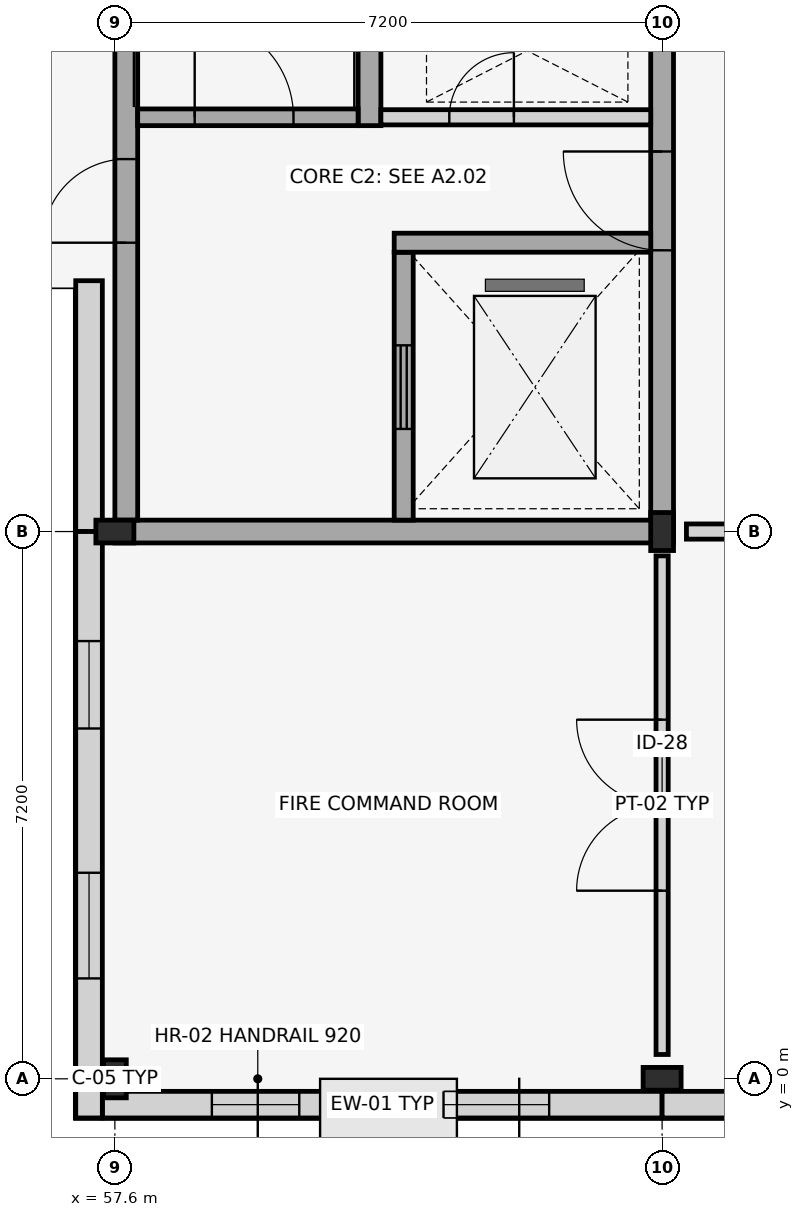
"""IFC4 building model, lengths in metres.
Left out: names, types, materials, properties, quantities, classifications, styles, units other than length and angle.
Written with IfcOpenShell. Run it as: python <this file> out.ifc"""

import sys

from ifc_helpers import new_model, si_unit, direction, frame, frame_2d, origin, origin_2d, place, context, subcontext, project, spatial, rectangle, i_section, extrude, element, fill, save


model = new_model("IFC4")
c1 = context("Model", 3, precision=1e-05, world=origin(), true_north=direction((0.0, 1.0)))
c2 = subcontext(c1, "Body", "Model", "MODEL_VIEW")
j1 = project(units=[si_unit("LENGTHUNIT", "METRE"), si_unit("PLANEANGLEUNIT", "RADIAN")], contexts=[c1])
p1 = place(None, origin())
s1 = spatial("IfcSite", under=j1, at=p1, CompositionType="ELEMENT")
p2 = place(p1, origin())
s2 = spatial("IfcBuilding", under=s1, at=p2, CompositionType="ELEMENT")
p3 = place(p2, origin())
s3 = spatial("IfcBuildingStorey", under=s2, at=p3, CompositionType="ELEMENT", Elevation=0.0)
for number, where, z_axis, x_axis in (
    (1, (57.6, 0.0, 0.0), (0.0, 0.0, 1.0), (1.0, 0.0, 0.0)),
    (2, (57.6, 7.2, 0.0), (0.0, 0.0, 1.0), (0.0, 1.0, 0.0)),
    (3, (64.8, 0.0, 0.0), (0.0, 0.0, 1.0), (0.0, 1.0, 0.0)),
    (4, (64.8, 7.2, 0.0), (0.0, 0.0, 1.0), (1.0, 0.0, 0.0)),
):
    element("IfcColumn", number, at=place(p3, frame(where, z_axis=z_axis, x_axis=x_axis)), inside=s3, PredefinedType="COLUMN", context=c2, shape_type="SweptSolid", body=[
        extrude(i_section(OverallWidth=0.3, OverallDepth=0.5, WebThickness=0.014, FlangeThickness=0.028, FilletRadius=0.027, at=origin_2d()), origin(), (0.0, 0.0, 1.0), 4.5),
    ])
p4 = place(p3, frame((57.435, -0.34, 0.0), z_axis=(0.0, 0.0, 1.0), x_axis=(1.0, 0.0, 0.0)))
e5 = element("IfcWall", 5, at=p4, inside=s3, PredefinedType="STANDARD", context=c2, shape_type="SweptSolid", body=[
    extrude(rectangle(XDim=7.365, YDim=0.35, at=frame_2d((3.683, 0.0))), origin(), (0.0, 0.0, 1.0), 4.5),
])
p5 = place(p4, frame((1.441, 0.0, 0.9)))
e6 = element("IfcOpeningElement", 6, at=p5, cuts=e5, PredefinedType="OPENING", context=c2, shape_type="SweptSolid", body=[
    extrude(rectangle(XDim=1.15, YDim=1.68, at=frame_2d((0.575, 0.84))), frame((0.0, 0.185, 0.0), z_axis=(0.0, -1.0, 0.0), x_axis=(1.0, 0.0, 0.0)), (0.0, 0.0, 1.0), 0.37),
])
p6 = place(p4, frame((4.489, 0.0, 0.9)))
e7 = element("IfcOpeningElement", 7, at=p6, cuts=e5, PredefinedType="OPENING", context=c2, shape_type="SweptSolid", body=[
    extrude(rectangle(XDim=1.39, YDim=1.68, at=frame_2d((0.695, 0.84))), frame((0.0, 0.185, 0.0), z_axis=(0.0, -1.0, 0.0), x_axis=(1.0, 0.0, 0.0)), (0.0, 0.0, 1.0), 0.37),
])
p7 = place(p3, frame((64.8, -0.34, 0.0), z_axis=(0.0, 0.0, 1.0), x_axis=(1.0, 0.0, 0.0)))
e8 = element("IfcWall", 8, at=p7, inside=s3, PredefinedType="STANDARD", context=c2, shape_type="SweptSolid", body=[
    extrude(rectangle(XDim=7.2, YDim=0.35, at=frame_2d((3.6, 0.0))), origin(), (0.0, 0.0, 1.0), 4.5),
])
p8 = place(p7, frame((1.201, 0.0, 0.9)))
e9 = element("IfcOpeningElement", 9, at=p8, cuts=e8, PredefinedType="OPENING", context=c2, shape_type="SweptSolid", body=[
    extrude(rectangle(XDim=1.63, YDim=1.68, at=frame_2d((0.815, 0.84))), frame((0.0, 0.185, 0.0), z_axis=(0.0, -1.0, 0.0), x_axis=(1.0, 0.0, 0.0)), (0.0, 0.0, 1.0), 0.37),
])
p9 = place(p7, frame((4.249, 0.0, 0.9)))
e10 = element("IfcOpeningElement", 10, at=p9, cuts=e8, PredefinedType="OPENING", context=c2, shape_type="SweptSolid", body=[
    extrude(rectangle(XDim=1.87, YDim=1.68, at=frame_2d((0.935, 0.84))), frame((0.0, 0.185, 0.0), z_axis=(0.0, -1.0, 0.0), x_axis=(1.0, 0.0, 0.0)), (0.0, 0.0, 1.0), 0.37),
])
p10 = place(p3, frame((57.26, 10.5, 0.0), z_axis=(0.0, 0.0, 1.0), x_axis=(0.0, -1.0, 0.0)))
e11 = element("IfcWall", 11, at=p10, inside=s3, PredefinedType="STANDARD", context=c2, shape_type="SweptSolid", body=[
    extrude(rectangle(XDim=3.3, YDim=0.35, at=frame_2d((1.65, 0.0))), origin(), (0.0, 0.0, 1.0), 4.5),
])
p11 = place(p3, frame((57.26, 7.2, 0.0), z_axis=(0.0, 0.0, 1.0), x_axis=(0.0, -1.0, 0.0)))
e12 = element("IfcWall", 12, at=p11, inside=s3, PredefinedType="STANDARD", context=c2, shape_type="SweptSolid", body=[
    extrude(rectangle(XDim=7.715, YDim=0.35, at=frame_2d((3.857, 0.0))), origin(), (0.0, 0.0, 1.0), 4.5),
])
p12 = place(p11, frame((1.441, 0.0, 0.9)))
e13 = element("IfcOpeningElement", 13, at=p12, cuts=e12, PredefinedType="OPENING", context=c2, shape_type="SweptSolid", body=[
    extrude(rectangle(XDim=1.15, YDim=1.68, at=frame_2d((0.575, 0.84))), frame((0.0, 0.185, 0.0), z_axis=(0.0, -1.0, 0.0), x_axis=(1.0, 0.0, 0.0)), (0.0, 0.0, 1.0), 0.37),
])
p13 = place(p11, frame((4.489, 0.0, 0.9)))
e14 = element("IfcOpeningElement", 14, at=p13, cuts=e12, PredefinedType="OPENING", context=c2, shape_type="SweptSolid", body=[
    extrude(rectangle(XDim=1.39, YDim=1.68, at=frame_2d((0.695, 0.84))), frame((0.0, 0.185, 0.0), z_axis=(0.0, -1.0, 0.0), x_axis=(1.0, 0.0, 0.0)), (0.0, 0.0, 1.0), 0.37),
])
p14 = place(p3, frame((57.6, 7.2, 0.0), z_axis=(0.0, 0.0, 1.0), x_axis=(1.0, 0.0, 0.0)))
e15 = element("IfcWall", 15, at=p14, inside=s3, PredefinedType="SHEAR", context=c2, shape_type="SweptSolid", body=[
    extrude(rectangle(XDim=7.35, YDim=0.3, at=frame_2d((3.675, 0.0))), origin(), (0.0, 0.0, 1.0), 4.28),
])
p15 = place(p3, frame((57.75, 7.35, 0.0), z_axis=(0.0, 0.0, 1.0), x_axis=(0.0, 1.0, 0.0)))
e16 = element("IfcWall", 16, at=p15, inside=s3, PredefinedType="SHEAR", context=c2, shape_type="SweptSolid", body=[
    extrude(rectangle(XDim=7.05, YDim=0.3, at=frame_2d((3.525, 0.0))), origin(), (0.0, 0.0, 1.0), 4.28),
])
p16 = place(p15, frame((3.65, 0.0, 0.0)))
e17 = element("IfcOpeningElement", 17, at=p16, cuts=e16, PredefinedType="OPENING", context=c2, shape_type="SweptSolid", body=[
    extrude(rectangle(XDim=1.1, YDim=2.2, at=frame_2d((0.55, 1.1))), frame((0.0, 0.16, 0.0), z_axis=(0.0, -1.0, 0.0), x_axis=(1.0, 0.0, 0.0)), (0.0, 0.0, 1.0), 0.32),
])
p17 = place(p3, frame((64.8, 7.35, 0.0), z_axis=(0.0, 0.0, 1.0), x_axis=(0.0, 1.0, 0.0)))
e18 = element("IfcWall", 18, at=p17, inside=s3, PredefinedType="SHEAR", context=c2, shape_type="SweptSolid", body=[
    extrude(rectangle(XDim=14.1, YDim=0.3, at=frame_2d((7.05, 0.0))), origin(), (0.0, 0.0, 1.0), 4.28),
])
p18 = place(p17, frame((3.55, 0.0, 0.0)))
e19 = element("IfcOpeningElement", 19, at=p18, cuts=e18, PredefinedType="OPENING", context=c2, shape_type="SweptSolid", body=[
    extrude(rectangle(XDim=1.3, YDim=2.2, at=frame_2d((0.65, 1.1))), frame((0.0, 0.16, 0.0), z_axis=(0.0, -1.0, 0.0), x_axis=(1.0, 0.0, 0.0)), (0.0, 0.0, 1.0), 0.32),
])
p19 = place(p17, frame((7.85, 0.0, 0.0)))
e20 = element("IfcOpeningElement", 20, at=p19, cuts=e18, PredefinedType="OPENING", context=c2, shape_type="SweptSolid", body=[
    extrude(rectangle(XDim=1.05, YDim=2.15, at=frame_2d((0.525, 1.075))), frame((0.0, 0.16, 0.0), z_axis=(0.0, -1.0, 0.0), x_axis=(1.0, 0.0, 0.0)), (0.0, 0.0, 1.0), 0.32),
])
p20 = place(p17, frame((10.55, 0.0, 0.0)))
e21 = element("IfcOpeningElement", 21, at=p20, cuts=e18, PredefinedType="OPENING", context=c2, shape_type="SweptSolid", body=[
    extrude(rectangle(XDim=1.0, YDim=2.15, at=frame_2d((0.5, 1.075))), frame((0.0, 0.16, 0.0), z_axis=(0.0, -1.0, 0.0), x_axis=(1.0, 0.0, 0.0)), (0.0, 0.0, 1.0), 0.32),
])
p21 = place(p3, frame((61.4, 7.35, 0.0), z_axis=(0.0, 0.0, 1.0), x_axis=(0.0, 1.0, 0.0)))
e22 = element("IfcWall", 22, at=p21, inside=s3, PredefinedType="SHEAR", context=c2, shape_type="SweptSolid", body=[
    extrude(rectangle(XDim=3.525, YDim=0.25, at=frame_2d((1.762, 0.0))), origin(), (0.0, 0.0, 1.0), 4.28),
])
p22 = place(p21, frame((1.2, 0.0, 0.0)))
e23 = element("IfcOpeningElement", 23, at=p22, cuts=e22, PredefinedType="OPENING", context=c2, shape_type="SweptSolid", body=[
    extrude(rectangle(XDim=1.1, YDim=2.15, at=frame_2d((0.55, 1.075))), frame((0.0, 0.135, 0.0), z_axis=(0.0, -1.0, 0.0), x_axis=(1.0, 0.0, 0.0)), (0.0, 0.0, 1.0), 0.27),
])
p23 = place(p3, frame((60.95, 12.54, 0.0), z_axis=(0.0, 0.0, 1.0), x_axis=(0.0, 1.0, 0.0)))
e24 = element("IfcWall", 24, at=p23, inside=s3, PredefinedType="SHEAR", context=c2, shape_type="SweptSolid", body=[
    extrude(rectangle(XDim=8.91, YDim=0.3, at=frame_2d((4.455, 0.0))), origin(), (0.0, 0.0, 1.0), 4.28),
])
p24 = place(p3, frame((61.1, 12.65, 0.0), z_axis=(0.0, 0.0, 1.0), x_axis=(1.0, 0.0, 0.0)))
e25 = element("IfcWall", 25, at=p24, inside=s3, PredefinedType="PLUMBINGWALL", context=c2, shape_type="SweptSolid", body=[
    extrude(rectangle(XDim=3.55, YDim=0.2, at=frame_2d((1.775, 0.0))), origin(), (0.0, 0.0, 1.0), 3.7),
])
p25 = place(p24, frame((0.9, 0.0, 0.0)))
e26 = element("IfcOpeningElement", 26, at=p25, cuts=e25, PredefinedType="OPENING", context=c2, shape_type="SweptSolid", body=[
    extrude(rectangle(XDim=0.85, YDim=2.05, at=frame_2d((0.425, 1.025))), frame((0.0, 0.11, 0.0), z_axis=(0.0, -1.0, 0.0), x_axis=(1.0, 0.0, 0.0)), (0.0, 0.0, 1.0), 0.22),
])
p26 = place(p3, frame((57.9, 12.65, 0.0), z_axis=(0.0, 0.0, 1.0), x_axis=(1.0, 0.0, 0.0)))
e27 = element("IfcWall", 27, at=p26, inside=s3, PredefinedType="SHEAR", context=c2, shape_type="SweptSolid", body=[
    extrude(rectangle(XDim=2.9, YDim=0.22, at=frame_2d((1.45, 0.0))), origin(), (0.0, 0.0, 1.0), 4.28),
])
p27 = place(p26, frame((0.75, 0.0, 0.0)))
e28 = element("IfcOpeningElement", 28, at=p27, cuts=e27, PredefinedType="OPENING", context=c2, shape_type="SweptSolid", body=[
    extrude(rectangle(XDim=1.3, YDim=2.2, at=frame_2d((0.65, 1.1))), frame((0.0, 0.12, 0.0), z_axis=(0.0, -1.0, 0.0), x_axis=(1.0, 0.0, 0.0)), (0.0, 0.0, 1.0), 0.24),
])
p28 = place(p3, frame((61.275, 11.0, 0.0), z_axis=(0.0, 0.0, 1.0), x_axis=(1.0, 0.0, 0.0)))
e29 = element("IfcWall", 29, at=p28, inside=s3, PredefinedType="SHEAR", context=c2, shape_type="SweptSolid", body=[
    extrude(rectangle(XDim=3.375, YDim=0.25, at=frame_2d((1.688, 0.0))), origin(), (0.0, 0.0, 1.0), 4.28),
])
p29 = place(p3, frame((64.8, 0.32, 0.0), z_axis=(0.0, 0.0, 1.0), x_axis=(0.0, 1.0, 0.0)))
e30 = element("IfcWall", 30, at=p29, inside=s3, PredefinedType="PARTITIONING", context=c2, shape_type="SweptSolid", body=[
    extrude(rectangle(XDim=6.56, YDim=0.16, at=frame_2d((3.28, 0.0))), origin(), (0.0, 0.0, 1.0), 3.45),
])
p30 = place(p29, frame((2.155, 0.0, 0.0)))
e31 = element("IfcOpeningElement", 31, at=p30, cuts=e30, PredefinedType="OPENING", context=c2, shape_type="SweptSolid", body=[
    extrude(rectangle(XDim=2.25, YDim=2.7, at=frame_2d((1.125, 1.35))), frame((0.0, 0.09, 0.0), z_axis=(0.0, -1.0, 0.0), x_axis=(1.0, 0.0, 0.0)), (0.0, 0.0, 1.0), 0.18),
])
p31 = place(p3, frame((65.12, 7.2, 0.0), z_axis=(0.0, 0.0, 1.0), x_axis=(1.0, 0.0, 0.0)))
e32 = element("IfcWall", 32, at=p31, inside=s3, PredefinedType="PARTITIONING", context=c2, shape_type="SweptSolid", body=[
    extrude(rectangle(XDim=6.56, YDim=0.2, at=frame_2d((3.28, 0.0))), origin(), (0.0, 0.0, 1.0), 3.45),
])
p32 = place(p31, frame((2.53, 0.0, 0.0)))
e33 = element("IfcOpeningElement", 33, at=p32, cuts=e32, PredefinedType="OPENING", context=c2, shape_type="SweptSolid", body=[
    extrude(rectangle(XDim=1.5, YDim=2.25, at=frame_2d((0.75, 1.125))), frame((0.0, 0.11, 0.0), z_axis=(0.0, -1.0, 0.0), x_axis=(1.0, 0.0, 0.0)), (0.0, 0.0, 1.0), 0.22),
])
p33 = place(p5, origin())
e34 = element("IfcWindow", 34, at=p33, inside=s3, PartitioningType="SINGLE_PANEL", PredefinedType="WINDOW", context=c2, shape_type="SweptSolid", body=[
    extrude(rectangle(XDim=1.15, YDim=1.68, at=frame_2d((0.575, 0.84))), frame((0.0, 0.03, 0.0), z_axis=(0.0, -1.0, 0.0), x_axis=(1.0, 0.0, 0.0)), (0.0, 0.0, 1.0), 0.06),
])
fill(e6, e34)
p34 = place(p6, origin())
e35 = element("IfcWindow", 35, at=p34, inside=s3, PartitioningType="SINGLE_PANEL", PredefinedType="WINDOW", context=c2, shape_type="SweptSolid", body=[
    extrude(rectangle(XDim=1.39, YDim=1.68, at=frame_2d((0.695, 0.84))), frame((0.0, 0.03, 0.0), z_axis=(0.0, -1.0, 0.0), x_axis=(1.0, 0.0, 0.0)), (0.0, 0.0, 1.0), 0.06),
])
fill(e7, e35)
p35 = place(p12, origin())
e36 = element("IfcWindow", 36, at=p35, inside=s3, PartitioningType="SINGLE_PANEL", PredefinedType="WINDOW", context=c2, shape_type="SweptSolid", body=[
    extrude(rectangle(XDim=1.15, YDim=1.68, at=frame_2d((0.575, 0.84))), frame((0.0, 0.03, 0.0), z_axis=(0.0, -1.0, 0.0), x_axis=(1.0, 0.0, 0.0)), (0.0, 0.0, 1.0), 0.06),
])
fill(e13, e36)
p36 = place(p13, origin())
e37 = element("IfcWindow", 37, at=p36, inside=s3, PartitioningType="SINGLE_PANEL", PredefinedType="WINDOW", context=c2, shape_type="SweptSolid", body=[
    extrude(rectangle(XDim=1.39, YDim=1.68, at=frame_2d((0.695, 0.84))), frame((0.0, 0.03, 0.0), z_axis=(0.0, -1.0, 0.0), x_axis=(1.0, 0.0, 0.0)), (0.0, 0.0, 1.0), 0.06),
])
fill(e14, e37)
p37 = place(p16, origin())
e38 = element("IfcDoor", 38, at=p37, inside=s3, OperationType="SINGLE_SWING_LEFT", PredefinedType="DOOR", context=c2, shape_type="SweptSolid", body=[
    extrude(rectangle(XDim=1.1, YDim=2.2, at=frame_2d((0.55, 1.1))), frame((0.0, 0.025, 0.0), z_axis=(0.0, -1.0, 0.0), x_axis=(1.0, 0.0, 0.0)), (0.0, 0.0, 1.0), 0.05),
])
fill(e17, e38)
p38 = place(p18, origin())
e39 = element("IfcDoor", 39, at=p38, inside=s3, OperationType="SINGLE_SWING_RIGHT", PredefinedType="DOOR", context=c2, shape_type="SweptSolid", body=[
    extrude(rectangle(XDim=1.3, YDim=2.2, at=frame_2d((0.65, 1.1))), frame((0.0, 0.025, 0.0), z_axis=(0.0, -1.0, 0.0), x_axis=(1.0, 0.0, 0.0)), (0.0, 0.0, 1.0), 0.05),
])
fill(e19, e39)
p39 = place(p22, origin())
e40 = element("IfcDoor", 40, at=p39, inside=s3, OperationType="SLIDING_TO_LEFT", PredefinedType="DOOR", context=c2, shape_type="SweptSolid", body=[
    extrude(rectangle(XDim=1.1, YDim=2.15, at=frame_2d((0.55, 1.075))), frame((0.0, 0.025, 0.0), z_axis=(0.0, -1.0, 0.0), x_axis=(1.0, 0.0, 0.0)), (0.0, 0.0, 1.0), 0.05),
])
fill(e23, e40)
p40 = place(p25, origin())
e41 = element("IfcDoor", 41, at=p40, inside=s3, OperationType="SINGLE_SWING_RIGHT", PredefinedType="TRAPDOOR", context=c2, shape_type="SweptSolid", body=[
    extrude(rectangle(XDim=0.85, YDim=2.05, at=frame_2d((0.425, 1.025))), frame((0.0, 0.025, 0.0), z_axis=(0.0, -1.0, 0.0), x_axis=(1.0, 0.0, 0.0)), (0.0, 0.0, 1.0), 0.05),
])
fill(e26, e41)
p41 = place(p27, origin())
e42 = element("IfcDoor", 42, at=p41, inside=s3, OperationType="SINGLE_SWING_LEFT", PredefinedType="DOOR", context=c2, shape_type="SweptSolid", body=[
    extrude(rectangle(XDim=1.3, YDim=2.2, at=frame_2d((0.65, 1.1))), frame((0.0, 0.025, 0.0), z_axis=(0.0, -1.0, 0.0), x_axis=(1.0, 0.0, 0.0)), (0.0, 0.0, 1.0), 0.05),
])
fill(e28, e42)
p42 = place(p30, origin())
e43 = element("IfcDoor", 43, at=p42, inside=s3, OperationType="DOUBLE_DOOR_SINGLE_SWING", PredefinedType="DOOR", context=c2, shape_type="SweptSolid", body=[
    extrude(rectangle(XDim=2.25, YDim=2.7, at=frame_2d((1.125, 1.35))), frame((0.0, 0.025, 0.0), z_axis=(0.0, -1.0, 0.0), x_axis=(1.0, 0.0, 0.0)), (0.0, 0.0, 1.0), 0.05),
])
fill(e31, e43)
save(model, sys.argv[1])
